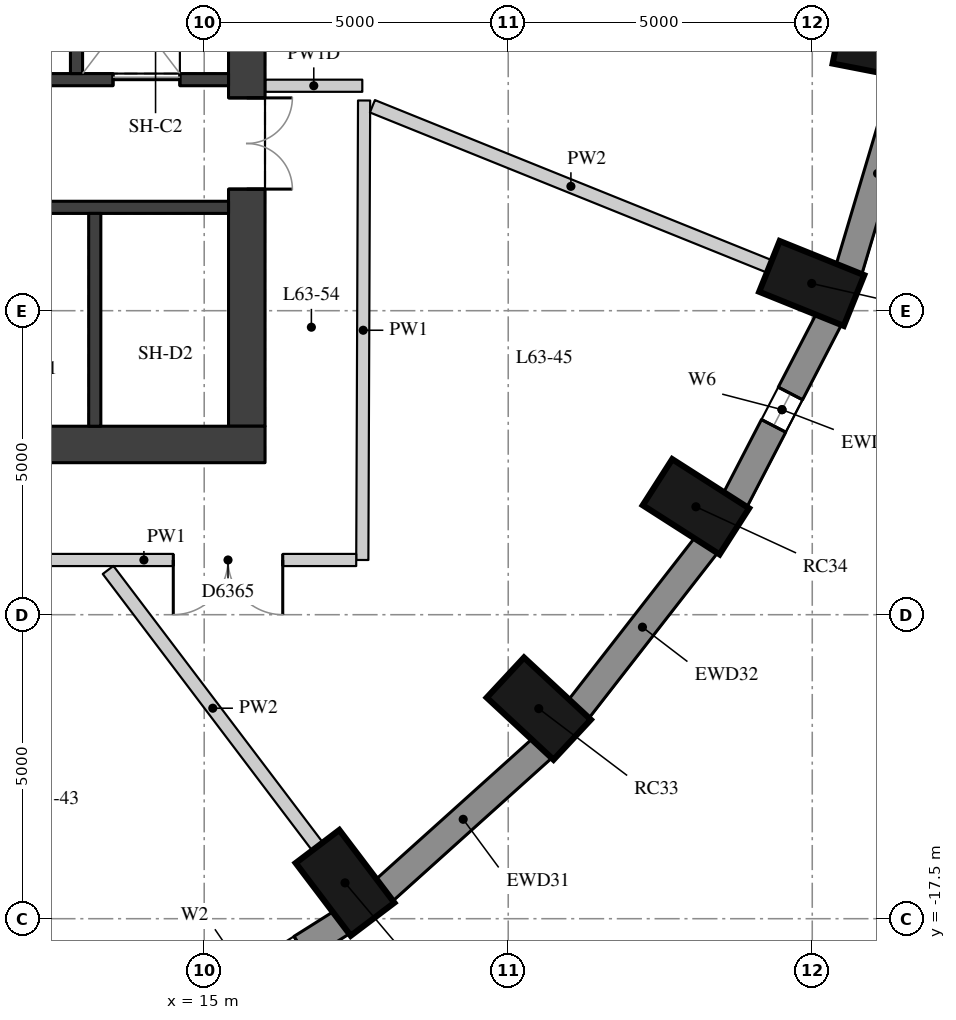
"""IFC4 building model, lengths in metres.
Left out: names, types, materials, properties, quantities, classifications, styles, units other than length and angle.
Written with IfcOpenShell. Run it as: python <this file> out.ifc"""

import sys

from ifc_helpers import new_model, si_unit, direction, frame, frame_2d, origin, origin_2d, place, context, subcontext, project, spatial, rectangle, extrude, element, fill, save


model = new_model("IFC4")
c1 = context("Model", 3, precision=1e-05, world=origin(), true_north=direction((0.0, 1.0)))
c2 = subcontext(c1, "Body", "Model", "MODEL_VIEW")
j1 = project(units=[si_unit("LENGTHUNIT", "METRE"), si_unit("PLANEANGLEUNIT", "RADIAN")], contexts=[c1])
p1 = place(None, origin())
s1 = spatial("IfcSite", under=j1, at=p1, CompositionType="ELEMENT")
p2 = place(p1, origin())
s2 = spatial("IfcBuilding", under=s1, at=p2, CompositionType="ELEMENT")
p3 = place(p2, frame((0.0, 0.0, 222.2)))
s3 = spatial("IfcBuildingStorey", under=s2, at=p3, CompositionType="ELEMENT", Elevation=222.2)
for number, where, z_axis, x_axis in (
    (1, (17.316, -16.911, 0.0), (0.0, 0.0, 1.0), (0.604, -0.797, 0.0)),
    (2, (20.502, -14.045, 0.0), (0.0, 0.0, 1.0), (0.732, -0.681, 0.0)),
    (3, (23.087, -10.725, 0.0), (0.0, 0.0, 1.0), (0.842, -0.539, 0.0)),
    (4, (24.991, -7.052, 0.0), (0.0, 0.0, 1.0), (0.927, -0.374, 0.0)),
    (5, (26.157, -3.137, 0.0), (0.0, 0.0, 1.0), (0.981, -0.192, 0.0)),
):
    element("IfcColumn", number, at=place(p3, frame(where, z_axis=z_axis, x_axis=x_axis)), inside=s3, PredefinedType="COLUMN", context=c2, shape_type="SweptSolid", body=[
        extrude(rectangle(XDim=1.5, YDim=0.9, at=origin_2d()), origin(), (0.0, 0.0, 1.0), 3.3),
    ])
p4 = place(p3, frame((14.232, -19.47, 0.0), z_axis=(0.0, 0.0, 1.0), x_axis=(0.84614984472, 0.532945063098, 0.0)))
e6 = element("IfcWall", 6, at=p4, inside=s3, PredefinedType="SOLIDWALL", context=c2, shape_type="SweptSolid", body=[
    extrude(rectangle(XDim=3.586, YDim=0.45, at=frame_2d((1.793, 0.0))), origin(), (0.0, 0.0, 1.0), 3.02),
])
p5 = place(p4, frame((0.793, 0.0, 0.4)))
e7 = element("IfcOpeningElement", 7, at=p5, cuts=e6, PredefinedType="OPENING", context=c2, shape_type="SweptSolid", body=[
    extrude(rectangle(XDim=2.0, YDim=1.75, at=frame_2d((1.0, 0.875))), frame((0.0, 0.235, 0.0), z_axis=(0.0, -1.0, 0.0), x_axis=(1.0, 0.0, 0.0)), (0.0, 0.0, 1.0), 0.47),
])
p6 = place(p3, frame((17.953, -17.04, 0.0), z_axis=(0.0, 0.0, 1.0), x_axis=(0.743442727602, 0.668799604348, 0.0)))
e8 = element("IfcWall", 8, at=p6, inside=s3, PredefinedType="SOLIDWALL", context=c2, shape_type="SweptSolid", body=[
    extrude(rectangle(XDim=3.513, YDim=0.45, at=frame_2d((1.756, 0.0))), origin(), (0.0, 0.0, 1.0), 3.02),
])
p7 = place(p3, frame((21.151, -14.061, 0.0), z_axis=(0.0, 0.0, 1.0), x_axis=(0.614255239631, 0.789107407509, 0.0)))
e9 = element("IfcWall", 9, at=p7, inside=s3, PredefinedType="SOLIDWALL", context=c2, shape_type="SweptSolid", body=[
    extrude(rectangle(XDim=3.438, YDim=0.45, at=frame_2d((1.719, 0.0))), origin(), (0.0, 0.0, 1.0), 3.02),
])
p8 = place(p3, frame((23.727, -10.624, 0.0), z_axis=(0.0, 0.0, 1.0), x_axis=(0.460175500475, 0.887827972505, 0.0)))
e10 = element("IfcWall", 10, at=p8, inside=s3, PredefinedType="SOLIDWALL", context=c2, shape_type="SweptSolid", body=[
    extrude(rectangle(XDim=3.371, YDim=0.45, at=frame_2d((1.685, 0.0))), origin(), (0.0, 0.0, 1.0), 3.02),
])
p9 = place(p8, frame((1.385, 0.0, 0.4)))
e11 = element("IfcOpeningElement", 11, at=p9, cuts=e10, PredefinedType="OPENING", context=c2, shape_type="SweptSolid", body=[
    extrude(rectangle(XDim=0.6, YDim=1.75, at=frame_2d((0.3, 0.875))), frame((0.0, 0.235, 0.0), z_axis=(0.0, -1.0, 0.0), x_axis=(1.0, 0.0, 0.0)), (0.0, 0.0, 1.0), 0.47),
])
p10 = place(p3, frame((25.6, -6.834, 0.0), z_axis=(0.0, 0.0, 1.0), x_axis=(0.285444972963, 0.958395099847, 0.0)))
e12 = element("IfcWall", 12, at=p10, inside=s3, PredefinedType="SOLIDWALL", context=c2, shape_type="SweptSolid", body=[
    extrude(rectangle(XDim=3.32, YDim=0.45, at=frame_2d((1.66, 0.0))), origin(), (0.0, 0.0, 1.0), 3.02),
])
p11 = place(p3, frame((15.7, -9.4, 0.0), z_axis=(0.0, 0.0, 1.0), x_axis=(0.0, 1.0, 0.0)))
e13 = element("IfcWall", 13, at=p11, inside=s3, PredefinedType="SHEAR", context=c2, shape_type="SweptSolid", body=[
    extrude(rectangle(XDim=18.8, YDim=0.6, at=frame_2d((9.4, 0.0))), origin(), (0.0, 0.0, 1.0), 3.02),
])
p12 = place(p11, frame((13.4, 0.0, 0.0)))
e14 = element("IfcOpeningElement", 14, at=p12, cuts=e13, PredefinedType="OPENING", context=c2, shape_type="SweptSolid", body=[
    extrude(rectangle(XDim=1.5, YDim=2.1, at=frame_2d((0.75, 1.05))), frame((0.0, 0.31, 0.0), z_axis=(0.0, -1.0, 0.0), x_axis=(1.0, 0.0, 0.0)), (0.0, 0.0, 1.0), 0.62),
])
p13 = place(p11, frame((3.9, 0.0, 0.0)))
e15 = element("IfcOpeningElement", 15, at=p13, cuts=e13, PredefinedType="OPENING", context=c2, shape_type="SweptSolid", body=[
    extrude(rectangle(XDim=1.5, YDim=2.1, at=frame_2d((0.75, 1.05))), frame((0.0, 0.31, 0.0), z_axis=(0.0, -1.0, 0.0), x_axis=(1.0, 0.0, 0.0)), (0.0, 0.0, 1.0), 0.62),
])
p14 = place(p3, frame((4.0, -9.7, 0.0), z_axis=(0.0, 0.0, 1.0), x_axis=(1.0, 0.0, 0.0)))
e16 = element("IfcWall", 16, at=p14, inside=s3, PredefinedType="SHEAR", context=c2, shape_type="SweptSolid", body=[
    extrude(rectangle(XDim=12.0, YDim=0.6, at=frame_2d((6.0, 0.0))), origin(), (0.0, 0.0, 1.0), 3.02),
])
p15 = place(p3, frame((4.6, -3.7, 0.0), z_axis=(0.0, 0.0, 1.0), x_axis=(1.0, 0.0, 0.0)))
e17 = element("IfcWall", 17, at=p15, inside=s3, PredefinedType="SHEAR", context=c2, shape_type="SweptSolid", body=[
    extrude(rectangle(XDim=10.8, YDim=0.2, at=frame_2d((5.4, 0.0))), origin(), (0.0, 0.0, 1.0), 3.02),
])
p16 = place(p15, frame((6.6, 0.0, 0.0)))
e18 = element("IfcOpeningElement", 18, at=p16, cuts=e17, PredefinedType="OPENING", context=c2, shape_type="SweptSolid", body=[
    extrude(rectangle(XDim=1.1, YDim=2.1, at=frame_2d((0.55, 1.05))), frame((0.0, 0.11, 0.0), z_axis=(0.0, -1.0, 0.0), x_axis=(1.0, 0.0, 0.0)), (0.0, 0.0, 1.0), 0.22),
])
p17 = place(p15, frame((8.9, 0.0, 0.0)))
e19 = element("IfcOpeningElement", 19, at=p17, cuts=e17, PredefinedType="OPENING", context=c2, shape_type="SweptSolid", body=[
    extrude(rectangle(XDim=1.1, YDim=2.1, at=frame_2d((0.55, 1.05))), frame((0.0, 0.11, 0.0), z_axis=(0.0, -1.0, 0.0), x_axis=(1.0, 0.0, 0.0)), (0.0, 0.0, 1.0), 0.22),
])
p18 = place(p3, frame((4.6, -5.8, 0.0), z_axis=(0.0, 0.0, 1.0), x_axis=(1.0, 0.0, 0.0)))
e20 = element("IfcWall", 20, at=p18, inside=s3, PredefinedType="SHEAR", context=c2, shape_type="SweptSolid", body=[
    extrude(rectangle(XDim=10.8, YDim=0.2, at=frame_2d((5.4, 0.0))), origin(), (0.0, 0.0, 1.0), 3.02),
])
p19 = place(p3, frame((13.2, -9.4, 0.0), z_axis=(0.0, 0.0, 1.0), x_axis=(0.0, 1.0, 0.0)))
e21 = element("IfcWall", 21, at=p19, inside=s3, PredefinedType="SHEAR", context=c2, shape_type="SweptSolid", body=[
    extrude(rectangle(XDim=3.5, YDim=0.2, at=frame_2d((1.75, 0.0))), origin(), (0.0, 0.0, 1.0), 3.02),
])
p20 = place(p3, frame((12.9, -3.6, 0.0), z_axis=(0.0, 0.0, 1.0), x_axis=(0.0, 1.0, 0.0)))
e22 = element("IfcWall", 22, at=p20, inside=s3, PredefinedType="SHEAR", context=c2, shape_type="SweptSolid", body=[
    extrude(rectangle(XDim=2.5, YDim=0.2, at=frame_2d((1.25, 0.0))), origin(), (0.0, 0.0, 1.0), 3.02),
])
p21 = place(p3, frame((17.63, -4.043, 0.0), z_axis=(0.0, 0.0, 1.0), x_axis=(-0.003908870153, -0.999992360338, 0.0)))
e23 = element("IfcWall", 23, at=p21, inside=s3, PredefinedType="PARTITIONING", context=c2, shape_type="SweptSolid", body=[
    extrude(rectangle(XDim=7.557, YDim=0.2, at=frame_2d((3.779, 0.0))), origin(), (0.0, 0.0, 1.0), 3.02),
])
p22 = place(p3, frame((17.5, -11.6, 0.0), z_axis=(0.0, 0.0, 1.0), x_axis=(-1.0, 0.0, 0.0)))
e24 = element("IfcWall", 24, at=p22, inside=s3, PredefinedType="PARTITIONING", context=c2, shape_type="SweptSolid", body=[
    extrude(rectangle(XDim=6.983, YDim=0.2, at=frame_2d((3.492, 0.0))), origin(), (0.0, 0.0, 1.0), 3.02),
])
p23 = place(p22, frame((5.743, 0.0, 0.0)))
e25 = element("IfcOpeningElement", 25, at=p23, cuts=e24, PredefinedType="OPENING", context=c2, shape_type="SweptSolid", body=[
    extrude(rectangle(XDim=1.1, YDim=2.1, at=frame_2d((0.55, 1.05))), frame((0.0, 0.11, 0.0), z_axis=(0.0, -1.0, 0.0), x_axis=(1.0, 0.0, 0.0)), (0.0, 0.0, 1.0), 0.22),
])
p24 = place(p22, frame((1.208, 0.0, 0.0)))
e26 = element("IfcOpeningElement", 26, at=p24, cuts=e24, PredefinedType="OPENING", context=c2, shape_type="SweptSolid", body=[
    extrude(rectangle(XDim=1.8, YDim=2.1, at=frame_2d((0.9, 1.05))), frame((0.0, 0.11, 0.0), z_axis=(0.0, -1.0, 0.0), x_axis=(1.0, 0.0, 0.0)), (0.0, 0.0, 1.0), 0.22),
])
p25 = place(p3, frame((16.004, -3.8, 0.0), z_axis=(0.0, 0.0, 1.0), x_axis=(1.0, 0.0, 0.0)))
e27 = element("IfcWall", 27, at=p25, inside=s3, PredefinedType="PARTITIONING", context=c2, shape_type="SweptSolid", body=[
    extrude(rectangle(XDim=1.596, YDim=0.2, at=frame_2d((0.798, 0.0))), origin(), (0.0, 0.0, 1.0), 2.47),
])
p26 = place(p3, frame((16.863, -16.312, 0.0), z_axis=(0.0, 0.0, 1.0), x_axis=(-0.603636051313, 0.797260006243, 0.0)))
e28 = element("IfcWall", 28, at=p26, inside=s3, PredefinedType="PARTITIONING", context=c2, shape_type="SweptSolid", body=[
    extrude(rectangle(XDim=5.706, YDim=0.22, at=frame_2d((2.853, 0.0))), origin(), (0.0, 0.0, 1.0), 3.02),
])
p27 = place(p3, frame((24.295, -6.771, 0.0), z_axis=(0.0, 0.0, 1.0), x_axis=(-0.927386950843, 0.374103519639, 0.0)))
e29 = element("IfcWall", 29, at=p27, inside=s3, PredefinedType="PARTITIONING", context=c2, shape_type="SweptSolid", body=[
    extrude(rectangle(XDim=7.04, YDim=0.22, at=frame_2d((3.52, 0.0))), origin(), (0.0, 0.0, 1.0), 3.02),
])
p28 = place(p9, origin())
e30 = element("IfcWindow", 30, at=p28, inside=s3, PartitioningType="SINGLE_PANEL", PredefinedType="WINDOW", context=c2, shape_type="SweptSolid", body=[
    extrude(rectangle(XDim=0.6, YDim=1.75, at=frame_2d((0.3, 0.875))), frame((0.0, 0.035, 0.0), z_axis=(0.0, -1.0, 0.0), x_axis=(1.0, 0.0, 0.0)), (0.0, 0.0, 1.0), 0.06),
])
fill(e11, e30)
p29 = place(p13, origin())
e31 = element("IfcDoor", 31, at=p29, inside=s3, OperationType="DOUBLE_DOOR_SINGLE_SWING", PredefinedType="DOOR", context=c2, shape_type="SweptSolid", body=[
    extrude(rectangle(XDim=1.5, YDim=2.1, at=frame_2d((0.75, 1.05))), frame((0.0, 0.025, 0.0), z_axis=(0.0, -1.0, 0.0), x_axis=(1.0, 0.0, 0.0)), (0.0, 0.0, 1.0), 0.05),
])
fill(e15, e31)
p30 = place(p17, origin())
e32 = element("IfcDoor", 32, at=p30, inside=s3, OperationType="DOUBLE_DOOR_SLIDING", PredefinedType="DOOR", context=c2, shape_type="SweptSolid", body=[
    extrude(rectangle(XDim=1.1, YDim=2.1, at=frame_2d((0.55, 1.05))), frame((0.0, 0.025, 0.0), z_axis=(0.0, -1.0, 0.0), x_axis=(1.0, 0.0, 0.0)), (0.0, 0.0, 1.0), 0.05),
])
fill(e19, e32)
p31 = place(p24, origin())
e33 = element("IfcDoor", 33, at=p31, inside=s3, OperationType="DOUBLE_DOOR_SINGLE_SWING", PredefinedType="DOOR", context=c2, shape_type="SweptSolid", body=[
    extrude(rectangle(XDim=1.8, YDim=2.1, at=frame_2d((0.9, 1.05))), frame((0.0, 0.025, 0.0), z_axis=(0.0, -1.0, 0.0), x_axis=(1.0, 0.0, 0.0)), (0.0, 0.0, 1.0), 0.05),
])
fill(e26, e33)
save(model, sys.argv[1])
